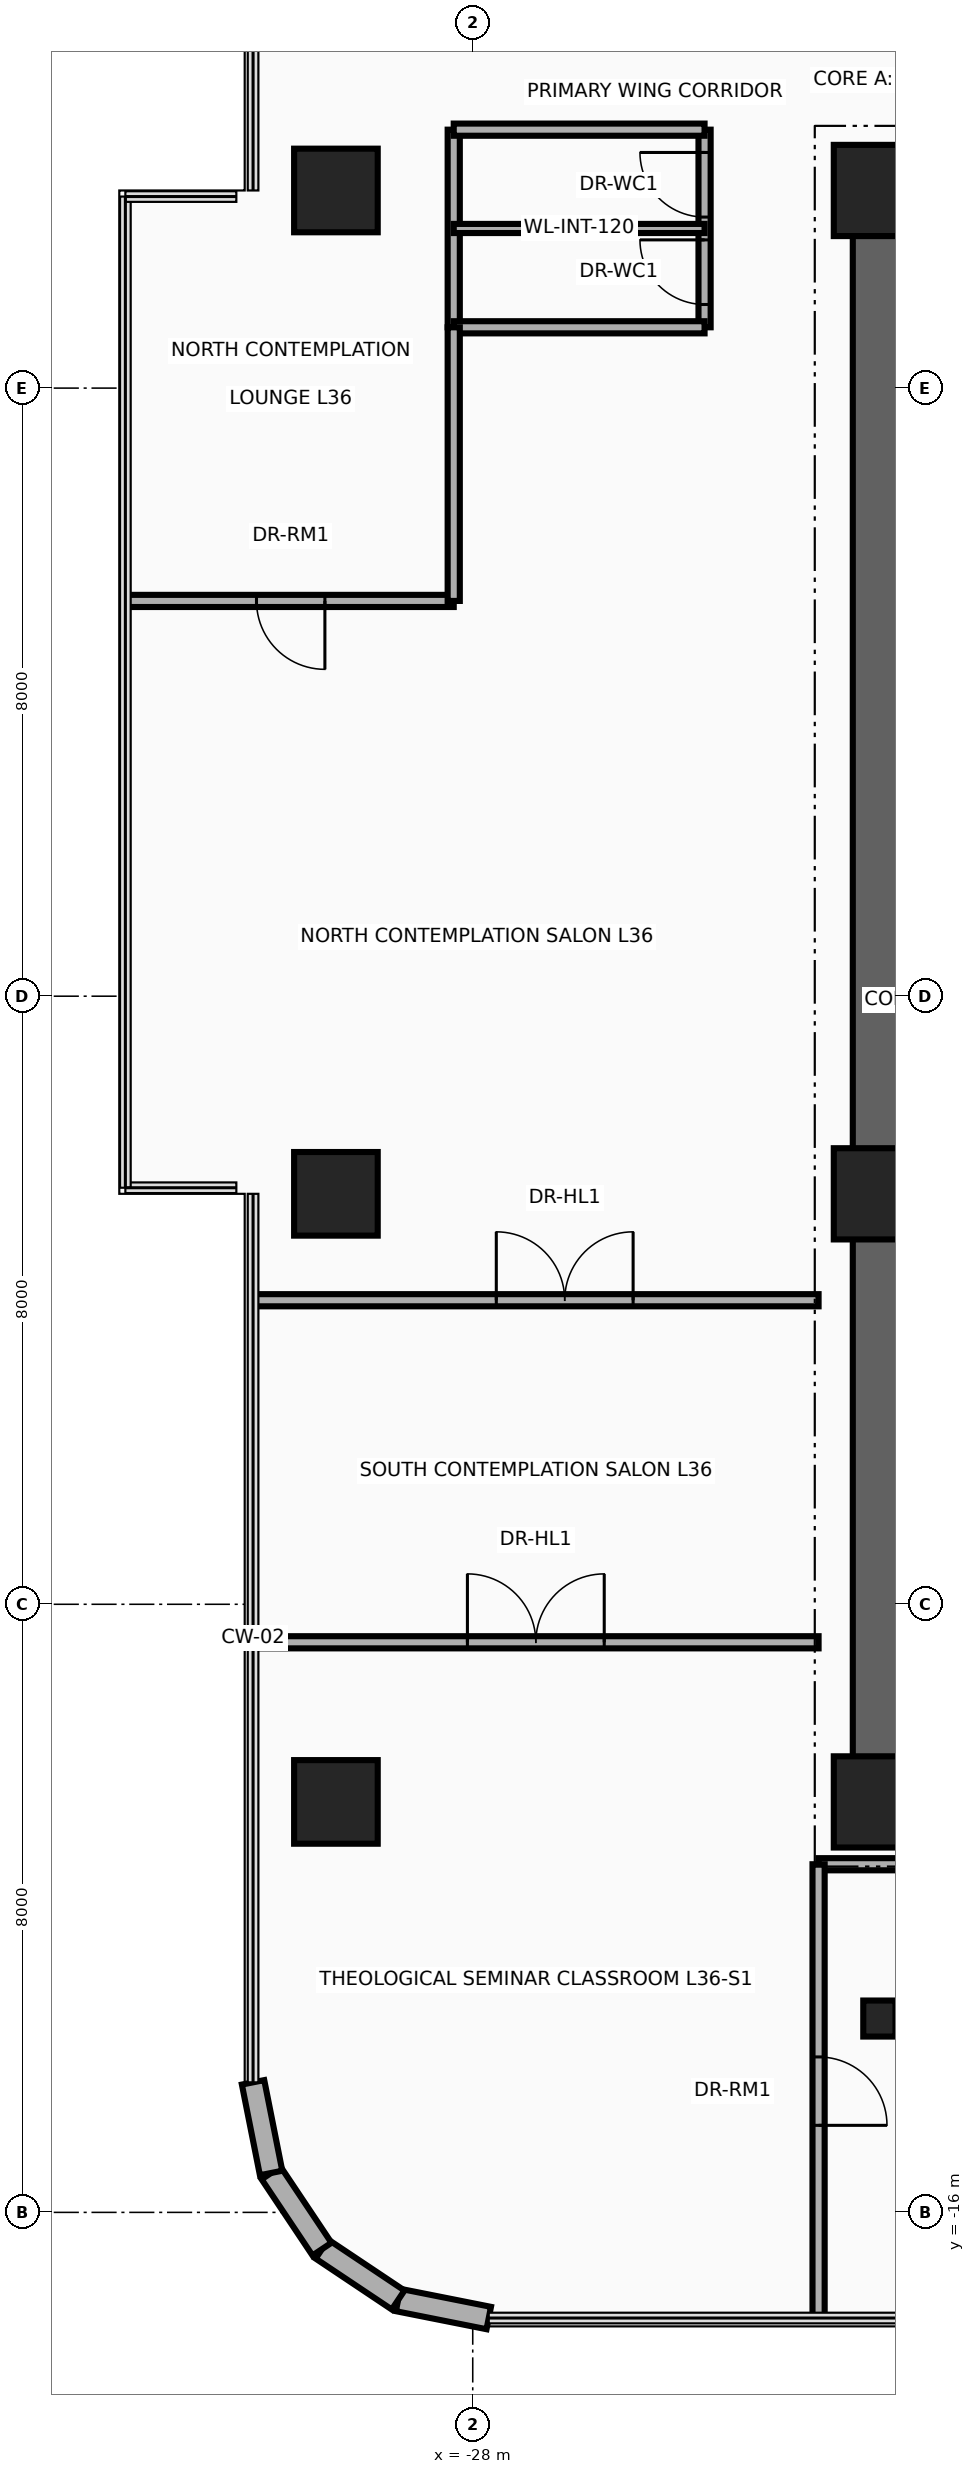
"""IFC4 building model, lengths in metres.
Left out: names, types, materials, properties, quantities, classifications, styles, units other than length and angle.
Written with IfcOpenShell. Run it as: python <this file> out.ifc"""

import sys

from ifc_helpers import new_model, si_unit, direction, frame, frame_2d, origin, origin_2d, place, context, subcontext, project, spatial, rectangle, circle, i_section, extrude, source, transform, mapped, element, fill, save


model = new_model("IFC4")
c1 = context("Model", 3, precision=1e-05, world=origin(), true_north=direction((0.0, 1.0)))
c2 = subcontext(c1, "Body", "Model", "MODEL_VIEW")
j1 = project(units=[si_unit("LENGTHUNIT", "METRE"), si_unit("PLANEANGLEUNIT", "RADIAN")], contexts=[c1])
p1 = place(None, origin())
s1 = spatial("IfcSite", under=j1, at=p1, CompositionType="ELEMENT")
p2 = place(p1, origin())
s2 = spatial("IfcBuilding", under=s1, at=p2, CompositionType="ELEMENT")
p3 = place(p2, frame((0.0, 0.0, 142.7)))
s3 = spatial("IfcBuildingStorey", under=s2, at=p3, CompositionType="ELEMENT", Elevation=142.7)
p4 = place(p3, frame((-22.65, -11.15, 0.0), z_axis=(0.0, 0.0, 1.0), x_axis=(0.0, 1.0, 0.0)))
e1 = element("IfcWall", 1, at=p4, inside=s3, PredefinedType="SHEAR", context=c2, shape_type="SweptSolid", body=[
    extrude(rectangle(XDim=22.3, YDim=0.7, at=frame_2d((11.15, 0.0))), origin(), (0.0, 0.0, 1.0), 3.46),
])
for number, where, z_axis, x_axis in (
    (2, (-22.65, 10.8, 0.0), (0.0, 0.0, 1.0), (1.0, 0.0, 0.0)),
    (3, (-22.65, -10.8, 0.0), (0.0, 0.0, 1.0), (1.0, 0.0, 0.0)),
):
    element("IfcWall", number, at=place(p3, frame(where, z_axis=z_axis, x_axis=x_axis)), inside=s3, PredefinedType="SHEAR", context=c2, shape_type="SweptSolid", body=[
        extrude(rectangle(XDim=10.25, YDim=0.7, at=frame_2d((5.125, 0.0))), origin(), (0.0, 0.0, 1.0), 3.46),
    ])
m1 = source(origin(), c2, "Body", "SweptSolid", [
    extrude(circle(Radius=0.55, at=origin_2d()), origin(), (0.0, 0.0, 1.0), 3.7),
])
p5 = place(p3, frame((-29.8, -10.6, 0.0), z_axis=(0.0, 0.0, 1.0), x_axis=(1.0, 0.0, 0.0)))
e4 = element("IfcColumn", 4, at=p5, inside=s3, PredefinedType="COLUMN", context=c2, shape_type="MappedRepresentation", body=[
    mapped(m1, transform((0.0, 0.0, 0.0), x_axis=(1.0, 0.0, 0.0), y_axis=(0.0, 1.0, 0.0), z_axis=(0.0, 0.0, 1.0), scale=1.0)),
])
m2 = source(origin(), c2, "Body", "SweptSolid", [
    extrude(rectangle(XDim=1.2, YDim=1.2, at=origin_2d()), origin(), (0.0, 0.0, 1.0), 3.7),
])
p6 = place(p3, frame((-22.65, -10.6, 0.0), z_axis=(0.0, 0.0, 1.0), x_axis=(1.0, 0.0, 0.0)))
e5 = element("IfcColumn", 5, at=p6, inside=s3, PredefinedType="COLUMN", context=c2, shape_type="MappedRepresentation", body=[
    mapped(m2, transform((0.0, 0.0, 0.0), x_axis=(1.0, 0.0, 0.0), y_axis=(0.0, 1.0, 0.0), z_axis=(0.0, 0.0, 1.0), scale=1.0)),
])
p7 = place(p3, frame((-29.8, -2.6, 0.0), z_axis=(0.0, 0.0, 1.0), x_axis=(1.0, 0.0, 0.0)))
e6 = element("IfcColumn", 6, at=p7, inside=s3, PredefinedType="COLUMN", context=c2, shape_type="MappedRepresentation", body=[
    mapped(m1, transform((0.0, 0.0, 0.0), x_axis=(1.0, 0.0, 0.0), y_axis=(0.0, 1.0, 0.0), z_axis=(0.0, 0.0, 1.0), scale=1.0)),
])
p8 = place(p3, frame((-22.65, -2.6, 0.0), z_axis=(0.0, 0.0, 1.0), x_axis=(1.0, 0.0, 0.0)))
e7 = element("IfcColumn", 7, at=p8, inside=s3, PredefinedType="COLUMN", context=c2, shape_type="MappedRepresentation", body=[
    mapped(m2, transform((0.0, 0.0, 0.0), x_axis=(1.0, 0.0, 0.0), y_axis=(0.0, 1.0, 0.0), z_axis=(0.0, 0.0, 1.0), scale=1.0)),
])
p9 = place(p3, frame((-29.8, 10.6, 0.0), z_axis=(0.0, 0.0, 1.0), x_axis=(1.0, 0.0, 0.0)))
e8 = element("IfcColumn", 8, at=p9, inside=s3, PredefinedType="COLUMN", context=c2, shape_type="MappedRepresentation", body=[
    mapped(m1, transform((0.0, 0.0, 0.0), x_axis=(1.0, 0.0, 0.0), y_axis=(0.0, 1.0, 0.0), z_axis=(0.0, 0.0, 1.0), scale=1.0)),
])
p10 = place(p3, frame((-22.65, 10.6, 0.0), z_axis=(0.0, 0.0, 1.0), x_axis=(1.0, 0.0, 0.0)))
e9 = element("IfcColumn", 9, at=p10, inside=s3, PredefinedType="COLUMN", context=c2, shape_type="MappedRepresentation", body=[
    mapped(m2, transform((0.0, 0.0, 0.0), x_axis=(1.0, 0.0, 0.0), y_axis=(0.0, 1.0, 0.0), z_axis=(0.0, 0.0, 1.0), scale=1.0)),
])
m3 = source(origin(), c2, "Body", "SweptSolid", [
    extrude(i_section(OverallWidth=0.424, OverallDepth=0.474, WebThickness=0.048, FlangeThickness=0.077, at=origin_2d()), origin(), (0.0, 0.0, 1.0), 3.7),
])
p11 = place(p3, frame((-22.65, -13.45, 0.0), z_axis=(0.0, 0.0, 1.0), x_axis=(1.0, 0.0, 0.0)))
e10 = element("IfcColumn", 10, at=p11, inside=s3, PredefinedType="COLUMN", context=c2, shape_type="MappedRepresentation", body=[
    mapped(m3, transform((0.0, 0.0, 0.0), x_axis=(1.0, 0.0, 0.0), y_axis=(0.0, 1.0, 0.0), z_axis=(0.0, 0.0, 1.0), scale=1.0)),
])
p12 = place(p3, frame((-27.789, -17.39, 0.0), z_axis=(0.0, 0.0, 1.0), x_axis=(-0.980804027463, 0.194996050505, 0.0)))
e11 = element("IfcWall", 11, at=p12, inside=s3, PredefinedType="SOLIDWALL", context=c2, shape_type="SweptSolid", body=[
    extrude(rectangle(XDim=1.216, YDim=0.3, at=frame_2d((0.608, 0.0))), origin(), (0.0, 0.0, 1.0), 3.46),
])
for number, where, z_axis, x_axis in (
    (12, (-28.982, -17.153, 0.0), (0.0, 0.0, 1.0), (-0.831, 0.556, 0.0)),
    (13, (-29.983, -16.483, 0.0), (0.0, 0.0, 1.0), (-0.556, 0.831, 0.0)),
):
    element("IfcWall", number, at=place(p3, frame(where, z_axis=z_axis, x_axis=x_axis)), inside=s3, PredefinedType="SOLIDWALL", context=c2, shape_type="SweptSolid", body=[
        extrude(rectangle(XDim=1.205, YDim=0.3, at=frame_2d((0.603, 0.0))), origin(), (0.0, 0.0, 1.0), 3.46),
    ])
p13 = place(p3, frame((-30.653, -15.482, 0.0), z_axis=(0.0, 0.0, 1.0), x_axis=(-0.194996050505, 0.980804027463, 0.0)))
e14 = element("IfcWall", 14, at=p13, inside=s3, PredefinedType="SOLIDWALL", context=c2, shape_type="SweptSolid", body=[
    extrude(rectangle(XDim=1.216, YDim=0.3, at=frame_2d((0.608, 0.0))), origin(), (0.0, 0.0, 1.0), 3.46),
])
p14 = place(p3, frame((-28.25, 8.8, 0.0), z_axis=(0.0, 0.0, 1.0), x_axis=(0.0, 1.0, 0.0)))
e15 = element("IfcWall", 15, at=p14, inside=s3, PredefinedType="PARTITIONING", context=c2, shape_type="SweptSolid", body=[
    extrude(rectangle(XDim=2.6, YDim=0.16, at=frame_2d((1.3, 0.0))), origin(), (0.0, 0.0, 1.0), 2.666),
])
p15 = place(p3, frame((-24.95, 8.8, 0.0), z_axis=(0.0, 0.0, 1.0), x_axis=(0.0, 1.0, 0.0)))
e16 = element("IfcWall", 16, at=p15, inside=s3, PredefinedType="PARTITIONING", context=c2, shape_type="SweptSolid", body=[
    extrude(rectangle(XDim=2.6, YDim=0.16, at=frame_2d((1.3, 0.0))), origin(), (0.0, 0.0, 1.0), 2.666),
])
p16 = place(p15, frame((0.3, 0.0, 0.0)))
e17 = element("IfcOpeningElement", 17, at=p16, cuts=e16, PredefinedType="OPENING", context=c2, shape_type="SweptSolid", body=[
    extrude(rectangle(XDim=0.85, YDim=2.1, at=frame_2d((0.425, 1.05))), frame((0.0, 0.095, 0.0), z_axis=(0.0, -1.0, 0.0), x_axis=(1.0, 0.0, 0.0)), (0.0, 0.0, 1.0), 0.19),
])
p17 = place(p15, frame((1.45, 0.0, 0.0)))
e18 = element("IfcOpeningElement", 18, at=p17, cuts=e16, PredefinedType="OPENING", context=c2, shape_type="SweptSolid", body=[
    extrude(rectangle(XDim=0.85, YDim=2.1, at=frame_2d((0.425, 1.05))), frame((0.0, 0.095, 0.0), z_axis=(0.0, -1.0, 0.0), x_axis=(1.0, 0.0, 0.0)), (0.0, 0.0, 1.0), 0.19),
])
for number, where, z_axis, x_axis in (
    (19, (-28.25, 8.8, 0.0), (0.0, 0.0, 1.0), (1.0, 0.0, 0.0)),
    (20, (-28.25, 11.4, 0.0), (0.0, 0.0, 1.0), (1.0, 0.0, 0.0)),
):
    element("IfcWall", number, at=place(p3, frame(where, z_axis=z_axis, x_axis=x_axis)), inside=s3, PredefinedType="PARTITIONING", context=c2, shape_type="SweptSolid", body=[
        extrude(rectangle(XDim=3.3, YDim=0.16, at=frame_2d((1.65, 0.0))), origin(), (0.0, 0.0, 1.0), 3.46),
    ])
p18 = place(p3, frame((-28.25, 10.1, 0.0), z_axis=(0.0, 0.0, 1.0), x_axis=(1.0, 0.0, 0.0)))
e21 = element("IfcWall", 21, at=p18, inside=s3, PredefinedType="PARTITIONING", context=c2, shape_type="SweptSolid", body=[
    extrude(rectangle(XDim=3.3, YDim=0.12, at=frame_2d((1.65, 0.0))), origin(), (0.0, 0.0, 1.0), 3.46),
])
p19 = place(p3, frame((-23.45, -11.42, 0.0), z_axis=(0.0, 0.0, 1.0), x_axis=(1.0, 0.0, 0.0)))
e22 = element("IfcWall", 22, at=p19, inside=s3, PredefinedType="PARTITIONING", context=c2, shape_type="SweptSolid", body=[
    extrude(rectangle(XDim=13.84, YDim=0.16, at=frame_2d((6.92, 0.0))), origin(), (0.0, 0.0, 1.0), 2.834),
])
p20 = place(p3, frame((-23.45, -17.39, 0.0), z_axis=(0.0, 0.0, 1.0), x_axis=(0.0, 1.0, 0.0)))
e23 = element("IfcWall", 23, at=p20, inside=s3, PredefinedType="PARTITIONING", context=c2, shape_type="SweptSolid", body=[
    extrude(rectangle(XDim=5.97, YDim=0.16, at=frame_2d((2.985, 0.0))), origin(), (0.0, 0.0, 1.0), 3.46),
])
p21 = place(p20, frame((2.535, 0.0, 0.0)))
e24 = element("IfcOpeningElement", 24, at=p21, cuts=e23, PredefinedType="OPENING", context=c2, shape_type="SweptSolid", body=[
    extrude(rectangle(XDim=0.9, YDim=2.1, at=frame_2d((0.45, 1.05))), frame((0.0, 0.095, 0.0), z_axis=(0.0, -1.0, 0.0), x_axis=(1.0, 0.0, 0.0)), (0.0, 0.0, 1.0), 0.19),
])
p22 = place(p3, frame((-30.89, -8.5, 0.0), z_axis=(0.0, 0.0, 1.0), x_axis=(1.0, 0.0, 0.0)))
e25 = element("IfcWall", 25, at=p22, inside=s3, PredefinedType="PARTITIONING", context=c2, shape_type="SweptSolid", body=[
    extrude(rectangle(XDim=7.44, YDim=0.16, at=frame_2d((3.72, 0.0))), origin(), (0.0, 0.0, 1.0), 2.896),
])
p23 = place(p22, frame((2.82, 0.0, 0.0)))
e26 = element("IfcOpeningElement", 26, at=p23, cuts=e25, PredefinedType="OPENING", context=c2, shape_type="SweptSolid", body=[
    extrude(rectangle(XDim=1.8, YDim=2.15, at=frame_2d((0.9, 1.075))), frame((0.0, 0.095, 0.0), z_axis=(0.0, -1.0, 0.0), x_axis=(1.0, 0.0, 0.0)), (0.0, 0.0, 1.0), 0.19),
])
p24 = place(p3, frame((-32.54, 5.2, 0.0), z_axis=(0.0, 0.0, 1.0), x_axis=(1.0, 0.0, 0.0)))
e27 = element("IfcWall", 27, at=p24, inside=s3, PredefinedType="PARTITIONING", context=c2, shape_type="SweptSolid", body=[
    extrude(rectangle(XDim=4.29, YDim=0.16, at=frame_2d((2.145, 0.0))), origin(), (0.0, 0.0, 1.0), 2.896),
])
p25 = place(p24, frame((1.695, 0.0, 0.0)))
e28 = element("IfcOpeningElement", 28, at=p25, cuts=e27, PredefinedType="OPENING", context=c2, shape_type="SweptSolid", body=[
    extrude(rectangle(XDim=0.9, YDim=2.1, at=frame_2d((0.45, 1.05))), frame((0.0, 0.095, 0.0), z_axis=(0.0, -1.0, 0.0), x_axis=(1.0, 0.0, 0.0)), (0.0, 0.0, 1.0), 0.19),
])
p26 = place(p3, frame((-28.25, 5.2, 0.0), z_axis=(0.0, 0.0, 1.0), x_axis=(0.0, 1.0, 0.0)))
e29 = element("IfcWall", 29, at=p26, inside=s3, PredefinedType="PARTITIONING", context=c2, shape_type="SweptSolid", body=[
    extrude(rectangle(XDim=3.6, YDim=0.16, at=frame_2d((1.8, 0.0))), origin(), (0.0, 0.0, 1.0), 2.988),
])
p27 = place(p3, frame((-30.89, -4.0, 0.0), z_axis=(0.0, 0.0, 1.0), x_axis=(1.0, 0.0, 0.0)))
e30 = element("IfcWall", 30, at=p27, inside=s3, PredefinedType="PARTITIONING", context=c2, shape_type="SweptSolid", body=[
    extrude(rectangle(XDim=7.44, YDim=0.16, at=frame_2d((3.72, 0.0))), origin(), (0.0, 0.0, 1.0), 2.896),
])
p28 = place(p27, frame((3.2, 0.0, 0.0)))
e31 = element("IfcOpeningElement", 31, at=p28, cuts=e30, PredefinedType="OPENING", context=c2, shape_type="SweptSolid", body=[
    extrude(rectangle(XDim=1.8, YDim=2.15, at=frame_2d((0.9, 1.075))), frame((0.0, 0.095, 0.0), z_axis=(0.0, -1.0, 0.0), x_axis=(1.0, 0.0, 0.0)), (0.0, 0.0, 1.0), 0.19),
])
p29 = place(p16, origin())
e32 = element("IfcDoor", 32, at=p29, inside=s3, OperationType="SINGLE_SWING_RIGHT", PredefinedType="DOOR", context=c2, shape_type="SweptSolid", body=[
    extrude(rectangle(XDim=0.85, YDim=2.1, at=frame_2d((0.425, 1.05))), frame((0.0, 0.025, 0.0), z_axis=(0.0, -1.0, 0.0), x_axis=(1.0, 0.0, 0.0)), (0.0, 0.0, 1.0), 0.05),
])
fill(e17, e32)
p30 = place(p17, origin())
e33 = element("IfcDoor", 33, at=p30, inside=s3, OperationType="SINGLE_SWING_LEFT", PredefinedType="DOOR", context=c2, shape_type="SweptSolid", body=[
    extrude(rectangle(XDim=0.85, YDim=2.1, at=frame_2d((0.425, 1.05))), frame((0.0, 0.025, 0.0), z_axis=(0.0, -1.0, 0.0), x_axis=(1.0, 0.0, 0.0)), (0.0, 0.0, 1.0), 0.05),
])
fill(e18, e33)
p31 = place(p23, origin())
e34 = element("IfcDoor", 34, at=p31, inside=s3, OperationType="DOUBLE_DOOR_SINGLE_SWING", PredefinedType="DOOR", context=c2, shape_type="SweptSolid", body=[
    extrude(rectangle(XDim=1.8, YDim=2.15, at=frame_2d((0.9, 1.075))), frame((0.0, 0.025, 0.0), z_axis=(0.0, -1.0, 0.0), x_axis=(1.0, 0.0, 0.0)), (0.0, 0.0, 1.0), 0.05),
])
fill(e26, e34)
p32 = place(p25, frame((0.9, 0.0, 0.0), z_axis=(0.0, 0.0, 1.0), x_axis=(-1.0, 0.0, 0.0)))
e35 = element("IfcDoor", 35, at=p32, inside=s3, OperationType="SINGLE_SWING_LEFT", PredefinedType="DOOR", context=c2, shape_type="SweptSolid", body=[
    extrude(rectangle(XDim=0.9, YDim=2.1, at=frame_2d((0.45, 1.05))), frame((0.0, 0.025, 0.0), z_axis=(0.0, -1.0, 0.0), x_axis=(1.0, 0.0, 0.0)), (0.0, 0.0, 1.0), 0.05),
])
fill(e28, e35)
p33 = place(p28, origin())
e36 = element("IfcDoor", 36, at=p33, inside=s3, OperationType="DOUBLE_DOOR_SINGLE_SWING", PredefinedType="DOOR", context=c2, shape_type="SweptSolid", body=[
    extrude(rectangle(XDim=1.8, YDim=2.15, at=frame_2d((0.9, 1.075))), frame((0.0, 0.025, 0.0), z_axis=(0.0, -1.0, 0.0), x_axis=(1.0, 0.0, 0.0)), (0.0, 0.0, 1.0), 0.05),
])
fill(e31, e36)
p34 = place(p21, frame((0.9, 0.0, 0.0), z_axis=(0.0, 0.0, 1.0), x_axis=(-1.0, 0.0, 0.0)))
e37 = element("IfcDoor", 37, at=p34, inside=s3, OperationType="SINGLE_SWING_LEFT", PredefinedType="DOOR", context=c2, shape_type="SweptSolid", body=[
    extrude(rectangle(XDim=0.9, YDim=2.1, at=frame_2d((0.45, 1.05))), frame((0.0, 0.025, 0.0), z_axis=(0.0, -1.0, 0.0), x_axis=(1.0, 0.0, 0.0)), (0.0, 0.0, 1.0), 0.05),
])
fill(e24, e37)
save(model, sys.argv[1])
